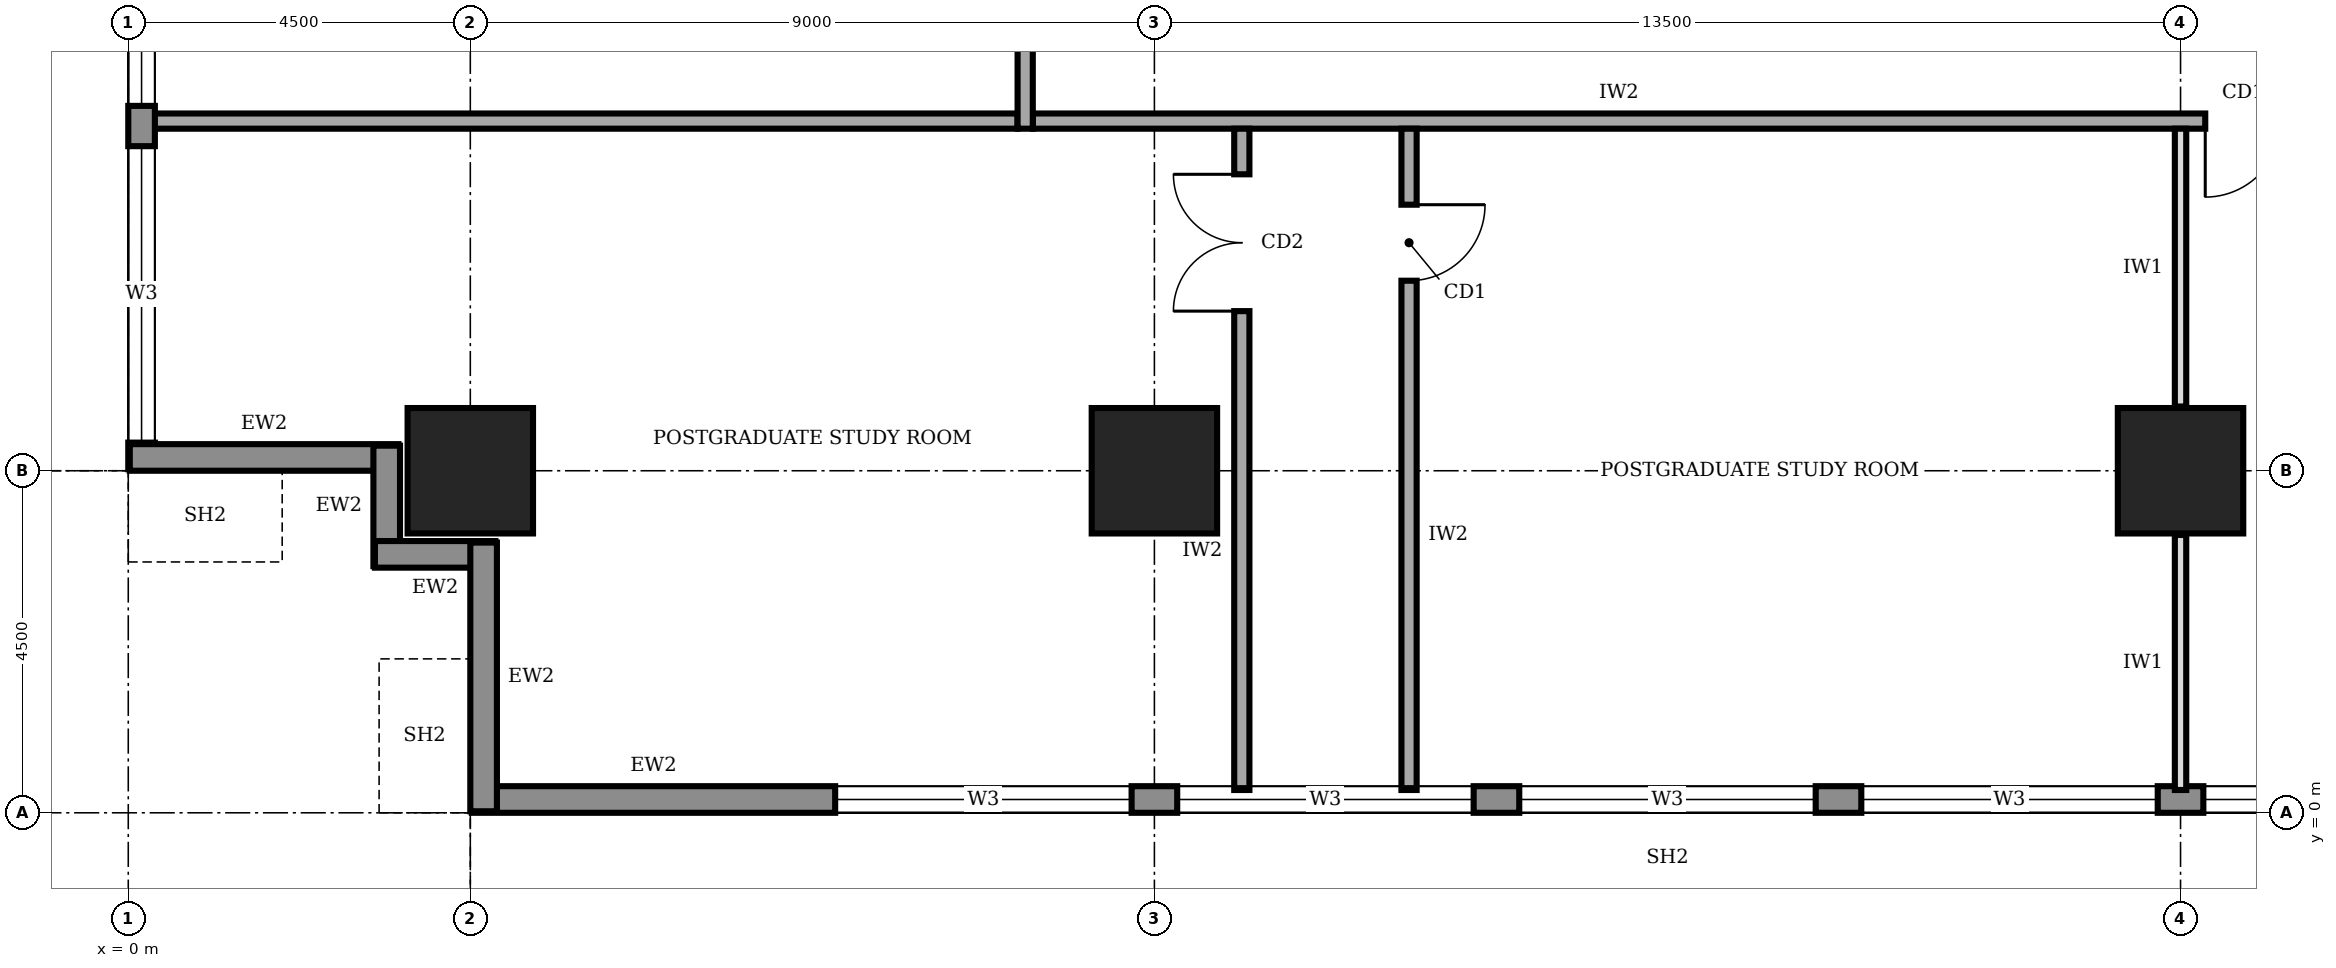
"""IFC4 building model, lengths in metres.
Left out: names, types, materials, properties, quantities, classifications, styles, units other than length and angle.
Written with IfcOpenShell. Run it as: python <this file> out.ifc"""

import sys

from ifc_helpers import new_model, si_unit, direction, frame, frame_2d, origin, origin_2d, place, context, subcontext, project, spatial, rectangle, extrude, element, fill, save


model = new_model("IFC4")
c1 = context("Model", 3, precision=1e-05, world=origin(), true_north=direction((0.0, 1.0)))
c2 = subcontext(c1, "Body", "Model", "MODEL_VIEW")
j1 = project(units=[si_unit("LENGTHUNIT", "METRE"), si_unit("PLANEANGLEUNIT", "RADIAN")], contexts=[c1])
p1 = place(None, origin())
s1 = spatial("IfcSite", under=j1, at=p1, CompositionType="ELEMENT")
p2 = place(p1, origin())
s2 = spatial("IfcBuilding", under=s1, at=p2, CompositionType="ELEMENT")
p3 = place(p2, frame((0.0, 0.0, 177.0)))
s3 = spatial("IfcBuildingStorey", under=s2, at=p3, CompositionType="ELEMENT", Elevation=177.0)
for number, where, z_axis, x_axis in (
    (1, (4.5, 4.5, 0.0), (0.0, 0.0, 1.0), (1.0, 0.0, 0.0)),
    (2, (13.5, 4.5, 0.0), (0.0, 0.0, 1.0), (1.0, 0.0, 0.0)),
    (3, (27.0, 4.5, 0.0), (0.0, 0.0, 1.0), (1.0, 0.0, 0.0)),
):
    element("IfcColumn", number, at=place(p3, frame(where, z_axis=z_axis, x_axis=x_axis)), inside=s3, PredefinedType="COLUMN", context=c2, shape_type="SweptSolid", body=[
        extrude(rectangle(XDim=1.65, YDim=1.65, at=origin_2d()), origin(), (0.0, 0.0, 1.0), 4.0),
    ])
p4 = place(p3, frame((4.52, 0.175, 0.0), z_axis=(0.0, 0.0, 1.0), x_axis=(1.0, 0.0, 0.0)))
e4 = element("IfcWall", 4, at=p4, inside=s3, PredefinedType="STANDARD", context=c2, shape_type="SweptSolid", body=[
    extrude(rectangle(XDim=31.46, YDim=0.35, at=frame_2d((15.73, 0.0))), origin(), (0.0, 0.0, 1.0), 3.75),
])
p5 = place(p4, frame((4.78, 0.0, 0.95)))
e5 = element("IfcOpeningElement", 5, at=p5, cuts=e4, PredefinedType="OPENING", context=c2, shape_type="SweptSolid", body=[
    extrude(rectangle(XDim=3.9, YDim=1.8, at=frame_2d((1.95, 0.9))), frame((0.0, 0.185, 0.0), z_axis=(0.0, -1.0, 0.0), x_axis=(1.0, 0.0, 0.0)), (0.0, 0.0, 1.0), 0.37),
])
p6 = place(p4, frame((9.28, 0.0, 0.95)))
e6 = element("IfcOpeningElement", 6, at=p6, cuts=e4, PredefinedType="OPENING", context=c2, shape_type="SweptSolid", body=[
    extrude(rectangle(XDim=3.9, YDim=1.8, at=frame_2d((1.95, 0.9))), frame((0.0, 0.185, 0.0), z_axis=(0.0, -1.0, 0.0), x_axis=(1.0, 0.0, 0.0)), (0.0, 0.0, 1.0), 0.37),
])
p7 = place(p4, frame((13.78, 0.0, 0.95)))
e7 = element("IfcOpeningElement", 7, at=p7, cuts=e4, PredefinedType="OPENING", context=c2, shape_type="SweptSolid", body=[
    extrude(rectangle(XDim=3.9, YDim=1.8, at=frame_2d((1.95, 0.9))), frame((0.0, 0.185, 0.0), z_axis=(0.0, -1.0, 0.0), x_axis=(1.0, 0.0, 0.0)), (0.0, 0.0, 1.0), 0.37),
])
p8 = place(p4, frame((18.28, 0.0, 0.95)))
e8 = element("IfcOpeningElement", 8, at=p8, cuts=e4, PredefinedType="OPENING", context=c2, shape_type="SweptSolid", body=[
    extrude(rectangle(XDim=3.9, YDim=1.8, at=frame_2d((1.95, 0.9))), frame((0.0, 0.185, 0.0), z_axis=(0.0, -1.0, 0.0), x_axis=(1.0, 0.0, 0.0)), (0.0, 0.0, 1.0), 0.37),
])
p9 = place(p4, frame((22.78, 0.0, 0.95)))
e9 = element("IfcOpeningElement", 9, at=p9, cuts=e4, PredefinedType="OPENING", context=c2, shape_type="SweptSolid", body=[
    extrude(rectangle(XDim=3.9, YDim=1.8, at=frame_2d((1.95, 0.9))), frame((0.0, 0.185, 0.0), z_axis=(0.0, -1.0, 0.0), x_axis=(1.0, 0.0, 0.0)), (0.0, 0.0, 1.0), 0.37),
])
p10 = place(p4, frame((27.21, 0.0, 0.95)))
e10 = element("IfcOpeningElement", 10, at=p10, cuts=e4, PredefinedType="OPENING", context=c2, shape_type="SweptSolid", body=[
    extrude(rectangle(XDim=3.9, YDim=1.8, at=frame_2d((1.95, 0.9))), frame((0.0, 0.185, 0.0), z_axis=(0.0, -1.0, 0.0), x_axis=(1.0, 0.0, 0.0)), (0.0, 0.0, 1.0), 0.37),
])
p11 = place(p3, frame((0.175, 35.98, 0.0), z_axis=(0.0, 0.0, 1.0), x_axis=(0.0, -1.0, 0.0)))
e11 = element("IfcWall", 11, at=p11, inside=s3, PredefinedType="STANDARD", context=c2, shape_type="SweptSolid", body=[
    extrude(rectangle(XDim=31.46, YDim=0.35, at=frame_2d((15.73, 0.0))), origin(), (0.0, 0.0, 1.0), 3.75),
])
p12 = place(p11, frame((27.21, 0.0, 0.95)))
e12 = element("IfcOpeningElement", 12, at=p12, cuts=e11, PredefinedType="OPENING", context=c2, shape_type="SweptSolid", body=[
    extrude(rectangle(XDim=3.9, YDim=1.8, at=frame_2d((1.95, 0.9))), frame((0.0, 0.185, 0.0), z_axis=(0.0, -1.0, 0.0), x_axis=(1.0, 0.0, 0.0)), (0.0, 0.0, 1.0), 0.37),
])
p13 = place(p11, frame((22.78, 0.0, 0.95)))
e13 = element("IfcOpeningElement", 13, at=p13, cuts=e11, PredefinedType="OPENING", context=c2, shape_type="SweptSolid", body=[
    extrude(rectangle(XDim=3.9, YDim=1.8, at=frame_2d((1.95, 0.9))), frame((0.0, 0.185, 0.0), z_axis=(0.0, -1.0, 0.0), x_axis=(1.0, 0.0, 0.0)), (0.0, 0.0, 1.0), 0.37),
])
p14 = place(p11, frame((18.28, 0.0, 0.95)))
e14 = element("IfcOpeningElement", 14, at=p14, cuts=e11, PredefinedType="OPENING", context=c2, shape_type="SweptSolid", body=[
    extrude(rectangle(XDim=3.9, YDim=1.8, at=frame_2d((1.95, 0.9))), frame((0.0, 0.185, 0.0), z_axis=(0.0, -1.0, 0.0), x_axis=(1.0, 0.0, 0.0)), (0.0, 0.0, 1.0), 0.37),
])
p15 = place(p11, frame((13.78, 0.0, 0.95)))
e15 = element("IfcOpeningElement", 15, at=p15, cuts=e11, PredefinedType="OPENING", context=c2, shape_type="SweptSolid", body=[
    extrude(rectangle(XDim=3.9, YDim=1.8, at=frame_2d((1.95, 0.9))), frame((0.0, 0.185, 0.0), z_axis=(0.0, -1.0, 0.0), x_axis=(1.0, 0.0, 0.0)), (0.0, 0.0, 1.0), 0.37),
])
p16 = place(p11, frame((9.28, 0.0, 0.95)))
e16 = element("IfcOpeningElement", 16, at=p16, cuts=e11, PredefinedType="OPENING", context=c2, shape_type="SweptSolid", body=[
    extrude(rectangle(XDim=3.9, YDim=1.8, at=frame_2d((1.95, 0.9))), frame((0.0, 0.185, 0.0), z_axis=(0.0, -1.0, 0.0), x_axis=(1.0, 0.0, 0.0)), (0.0, 0.0, 1.0), 0.37),
])
p17 = place(p11, frame((4.78, 0.0, 0.95)))
e17 = element("IfcOpeningElement", 17, at=p17, cuts=e11, PredefinedType="OPENING", context=c2, shape_type="SweptSolid", body=[
    extrude(rectangle(XDim=3.9, YDim=1.8, at=frame_2d((1.95, 0.9))), frame((0.0, 0.185, 0.0), z_axis=(0.0, -1.0, 0.0), x_axis=(1.0, 0.0, 0.0)), (0.0, 0.0, 1.0), 0.37),
])
p18 = place(p3, frame((0.02, 4.675, 0.0), z_axis=(0.0, 0.0, 1.0), x_axis=(1.0, 0.0, 0.0)))
e18 = element("IfcWall", 18, at=p18, inside=s3, PredefinedType="STANDARD", context=c2, shape_type="SweptSolid", body=[
    extrude(rectangle(XDim=3.535, YDim=0.35, at=frame_2d((1.768, 0.0))), origin(), (0.0, 0.0, 1.0), 2.85),
])
for number, where, z_axis, x_axis in (
    (19, (3.4, 4.83, 0.0), (0.0, 0.0, 1.0), (0.0, -1.0, 0.0)),
    (20, (3.245, 3.4, 0.0), (0.0, 0.0, 1.0), (1.0, 0.0, 0.0)),
):
    element("IfcWall", number, at=place(p3, frame(where, z_axis=z_axis, x_axis=x_axis)), inside=s3, PredefinedType="STANDARD", context=c2, shape_type="SweptSolid", body=[
        extrude(rectangle(XDim=1.585, YDim=0.35, at=frame_2d((0.792, 0.0))), origin(), (0.0, 0.0, 1.0), 3.75),
    ])
p19 = place(p3, frame((4.675, 3.555, 0.0), z_axis=(0.0, 0.0, 1.0), x_axis=(0.0, -1.0, 0.0)))
e21 = element("IfcWall", 21, at=p19, inside=s3, PredefinedType="STANDARD", context=c2, shape_type="SweptSolid", body=[
    extrude(rectangle(XDim=3.535, YDim=0.35, at=frame_2d((1.768, 0.0))), origin(), (0.0, 0.0, 1.0), 2.85),
])
p20 = place(p3, frame((11.9, 9.1, 0.0), z_axis=(0.0, 0.0, 1.0), x_axis=(1.0, 0.0, 0.0)))
e22 = element("IfcWall", 22, at=p20, inside=s3, PredefinedType="SOLIDWALL", context=c2, shape_type="SweptSolid", body=[
    extrude(rectangle(XDim=16.9, YDim=0.2, at=frame_2d((8.45, 0.0))), origin(), (0.0, 0.0, 1.0), 3.75),
])
p21 = place(p20, frame((15.425, 0.0, 0.0)))
e23 = element("IfcOpeningElement", 23, at=p21, cuts=e22, PredefinedType="OPENING", context=c2, shape_type="SweptSolid", body=[
    extrude(rectangle(XDim=1.0, YDim=2.1, at=frame_2d((0.5, 1.05))), frame((0.0, 0.11, 0.0), z_axis=(0.0, -1.0, 0.0), x_axis=(1.0, 0.0, 0.0)), (0.0, 0.0, 1.0), 0.22),
])
p22 = place(p3, frame((11.8, 31.3, 0.0), z_axis=(0.0, 0.0, 1.0), x_axis=(0.0, -1.0, 0.0)))
e24 = element("IfcWall", 24, at=p22, inside=s3, PredefinedType="SOLIDWALL", context=c2, shape_type="SweptSolid", body=[
    extrude(rectangle(XDim=22.3, YDim=0.2, at=frame_2d((11.15, 0.0))), origin(), (0.0, 0.0, 1.0), 3.75),
])
p23 = place(p22, frame((19.55, 0.0, 0.0)))
e25 = element("IfcOpeningElement", 25, at=p23, cuts=e24, PredefinedType="OPENING", context=c2, shape_type="SweptSolid", body=[
    extrude(rectangle(XDim=1.0, YDim=2.1, at=frame_2d((0.5, 1.05))), frame((0.0, 0.11, 0.0), z_axis=(0.0, -1.0, 0.0), x_axis=(1.0, 0.0, 0.0)), (0.0, 0.0, 1.0), 0.22),
])
p24 = place(p22, frame((16.15, 0.0, 0.0)))
e26 = element("IfcOpeningElement", 26, at=p24, cuts=e24, PredefinedType="OPENING", context=c2, shape_type="SweptSolid", body=[
    extrude(rectangle(XDim=0.9, YDim=2.1, at=frame_2d((0.45, 1.05))), frame((0.0, 0.11, 0.0), z_axis=(0.0, -1.0, 0.0), x_axis=(1.0, 0.0, 0.0)), (0.0, 0.0, 1.0), 0.22),
])
p25 = place(p22, frame((12.95, 0.0, 0.0)))
e27 = element("IfcOpeningElement", 27, at=p25, cuts=e24, PredefinedType="OPENING", context=c2, shape_type="SweptSolid", body=[
    extrude(rectangle(XDim=0.9, YDim=2.1, at=frame_2d((0.45, 1.05))), frame((0.0, 0.11, 0.0), z_axis=(0.0, -1.0, 0.0), x_axis=(1.0, 0.0, 0.0)), (0.0, 0.0, 1.0), 0.22),
])
p26 = place(p22, frame((7.4, 0.0, 0.0)))
e28 = element("IfcOpeningElement", 28, at=p26, cuts=e24, PredefinedType="OPENING", context=c2, shape_type="SweptSolid", body=[
    extrude(rectangle(XDim=0.9, YDim=2.1, at=frame_2d((0.45, 1.05))), frame((0.0, 0.11, 0.0), z_axis=(0.0, -1.0, 0.0), x_axis=(1.0, 0.0, 0.0)), (0.0, 0.0, 1.0), 0.22),
])
p27 = place(p22, frame((4.8, 0.0, 0.0)))
e29 = element("IfcOpeningElement", 29, at=p27, cuts=e24, PredefinedType="OPENING", context=c2, shape_type="SweptSolid", body=[
    extrude(rectangle(XDim=1.0, YDim=2.1, at=frame_2d((0.5, 1.05))), frame((0.0, 0.11, 0.0), z_axis=(0.0, -1.0, 0.0), x_axis=(1.0, 0.0, 0.0)), (0.0, 0.0, 1.0), 0.22),
])
p28 = place(p22, frame((9.9, 0.0, 0.0)))
e30 = element("IfcOpeningElement", 30, at=p28, cuts=e24, PredefinedType="OPENING", context=c2, shape_type="SweptSolid", body=[
    extrude(rectangle(XDim=1.0, YDim=2.1, at=frame_2d((0.5, 1.05))), frame((0.0, 0.11, 0.0), z_axis=(0.0, -1.0, 0.0), x_axis=(1.0, 0.0, 0.0)), (0.0, 0.0, 1.0), 0.22),
])
p29 = place(p22, frame((1.55, 0.0, 0.0)))
e31 = element("IfcOpeningElement", 31, at=p29, cuts=e24, PredefinedType="OPENING", context=c2, shape_type="SweptSolid", body=[
    extrude(rectangle(XDim=1.0, YDim=2.1, at=frame_2d((0.5, 1.05))), frame((0.0, 0.11, 0.0), z_axis=(0.0, -1.0, 0.0), x_axis=(1.0, 0.0, 0.0)), (0.0, 0.0, 1.0), 0.22),
])
p30 = place(p3, frame((14.65, 0.3, 0.0), z_axis=(0.0, 0.0, 1.0), x_axis=(0.0, 1.0, 0.0)))
e32 = element("IfcWall", 32, at=p30, inside=s3, PredefinedType="SOLIDWALL", context=c2, shape_type="SweptSolid", body=[
    extrude(rectangle(XDim=8.7, YDim=0.2, at=frame_2d((4.35, 0.0))), origin(), (0.0, 0.0, 1.0), 3.75),
])
p31 = place(p30, frame((6.3, 0.0, 0.0)))
e33 = element("IfcOpeningElement", 33, at=p31, cuts=e32, PredefinedType="OPENING", context=c2, shape_type="SweptSolid", body=[
    extrude(rectangle(XDim=1.8, YDim=2.1, at=frame_2d((0.9, 1.05))), frame((0.0, 0.11, 0.0), z_axis=(0.0, -1.0, 0.0), x_axis=(1.0, 0.0, 0.0)), (0.0, 0.0, 1.0), 0.22),
])
p32 = place(p3, frame((16.85, 9.0, 0.0), z_axis=(0.0, 0.0, 1.0), x_axis=(0.0, -1.0, 0.0)))
e34 = element("IfcWall", 34, at=p32, inside=s3, PredefinedType="SOLIDWALL", context=c2, shape_type="SweptSolid", body=[
    extrude(rectangle(XDim=8.7, YDim=0.2, at=frame_2d((4.35, 0.0))), origin(), (0.0, 0.0, 1.0), 3.75),
])
p33 = place(p32, frame((1.0, 0.0, 0.0)))
e35 = element("IfcOpeningElement", 35, at=p33, cuts=e34, PredefinedType="OPENING", context=c2, shape_type="SweptSolid", body=[
    extrude(rectangle(XDim=1.0, YDim=2.1, at=frame_2d((0.5, 1.05))), frame((0.0, 0.11, 0.0), z_axis=(0.0, -1.0, 0.0), x_axis=(1.0, 0.0, 0.0)), (0.0, 0.0, 1.0), 0.22),
])
p34 = place(p3, frame((0.3, 9.1, 0.0), z_axis=(0.0, 0.0, 1.0), x_axis=(1.0, 0.0, 0.0)))
e36 = element("IfcWall", 36, at=p34, inside=s3, PredefinedType="SOLIDWALL", context=c2, shape_type="SweptSolid", body=[
    extrude(rectangle(XDim=11.4, YDim=0.2, at=frame_2d((5.7, 0.0))), origin(), (0.0, 0.0, 1.0), 3.75),
])
p35 = place(p3, frame((27.0, 0.3, 0.0), z_axis=(0.0, 0.0, 1.0), x_axis=(0.0, 1.0, 0.0)))
e37 = element("IfcWall", 37, at=p35, inside=s3, PredefinedType="PARTITIONING", context=c2, shape_type="SweptSolid", body=[
    extrude(rectangle(XDim=3.355, YDim=0.15, at=frame_2d((1.677, 0.0))), origin(), (0.0, 0.0, 1.0), 2.85),
])
p36 = place(p3, frame((27.0, 5.345, 0.0), z_axis=(0.0, 0.0, 1.0), x_axis=(0.0, 1.0, 0.0)))
e38 = element("IfcWall", 38, at=p36, inside=s3, PredefinedType="PARTITIONING", context=c2, shape_type="SweptSolid", body=[
    extrude(rectangle(XDim=3.655, YDim=0.15, at=frame_2d((1.828, 0.0))), origin(), (0.0, 0.0, 1.0), 2.85),
])
p37 = place(p5, origin())
e39 = element("IfcWindow", 39, at=p37, inside=s3, PartitioningType="SINGLE_PANEL", PredefinedType="WINDOW", context=c2, shape_type="SweptSolid", body=[
    extrude(rectangle(XDim=3.9, YDim=1.8, at=frame_2d((1.95, 0.9))), frame((0.0, 0.03, 0.0), z_axis=(0.0, -1.0, 0.0), x_axis=(1.0, 0.0, 0.0)), (0.0, 0.0, 1.0), 0.06),
])
fill(e5, e39)
p38 = place(p6, origin())
e40 = element("IfcWindow", 40, at=p38, inside=s3, PartitioningType="SINGLE_PANEL", PredefinedType="WINDOW", context=c2, shape_type="SweptSolid", body=[
    extrude(rectangle(XDim=3.9, YDim=1.8, at=frame_2d((1.95, 0.9))), frame((0.0, 0.03, 0.0), z_axis=(0.0, -1.0, 0.0), x_axis=(1.0, 0.0, 0.0)), (0.0, 0.0, 1.0), 0.06),
])
fill(e6, e40)
p39 = place(p7, origin())
e41 = element("IfcWindow", 41, at=p39, inside=s3, PartitioningType="SINGLE_PANEL", PredefinedType="WINDOW", context=c2, shape_type="SweptSolid", body=[
    extrude(rectangle(XDim=3.9, YDim=1.8, at=frame_2d((1.95, 0.9))), frame((0.0, 0.03, 0.0), z_axis=(0.0, -1.0, 0.0), x_axis=(1.0, 0.0, 0.0)), (0.0, 0.0, 1.0), 0.06),
])
fill(e7, e41)
p40 = place(p8, origin())
e42 = element("IfcWindow", 42, at=p40, inside=s3, PartitioningType="SINGLE_PANEL", PredefinedType="WINDOW", context=c2, shape_type="SweptSolid", body=[
    extrude(rectangle(XDim=3.9, YDim=1.8, at=frame_2d((1.95, 0.9))), frame((0.0, 0.03, 0.0), z_axis=(0.0, -1.0, 0.0), x_axis=(1.0, 0.0, 0.0)), (0.0, 0.0, 1.0), 0.06),
])
fill(e8, e42)
p41 = place(p9, origin())
e43 = element("IfcWindow", 43, at=p41, inside=s3, PartitioningType="SINGLE_PANEL", PredefinedType="WINDOW", context=c2, shape_type="SweptSolid", body=[
    extrude(rectangle(XDim=3.9, YDim=1.8, at=frame_2d((1.95, 0.9))), frame((0.0, 0.03, 0.0), z_axis=(0.0, -1.0, 0.0), x_axis=(1.0, 0.0, 0.0)), (0.0, 0.0, 1.0), 0.06),
])
fill(e9, e43)
p42 = place(p12, origin())
e44 = element("IfcWindow", 44, at=p42, inside=s3, PartitioningType="SINGLE_PANEL", PredefinedType="WINDOW", context=c2, shape_type="SweptSolid", body=[
    extrude(rectangle(XDim=3.9, YDim=1.8, at=frame_2d((1.95, 0.9))), frame((0.0, 0.03, 0.0), z_axis=(0.0, -1.0, 0.0), x_axis=(1.0, 0.0, 0.0)), (0.0, 0.0, 1.0), 0.06),
])
fill(e12, e44)
p43 = place(p13, origin())
e45 = element("IfcWindow", 45, at=p43, inside=s3, PartitioningType="SINGLE_PANEL", PredefinedType="WINDOW", context=c2, shape_type="SweptSolid", body=[
    extrude(rectangle(XDim=3.9, YDim=1.8, at=frame_2d((1.95, 0.9))), frame((0.0, 0.03, 0.0), z_axis=(0.0, -1.0, 0.0), x_axis=(1.0, 0.0, 0.0)), (0.0, 0.0, 1.0), 0.06),
])
fill(e13, e45)
p44 = place(p21, frame((1.0, 0.0, 0.0), z_axis=(0.0, 0.0, 1.0), x_axis=(-1.0, 0.0, 0.0)))
e46 = element("IfcDoor", 46, at=p44, inside=s3, OperationType="SINGLE_SWING_RIGHT", PredefinedType="DOOR", context=c2, shape_type="SweptSolid", body=[
    extrude(rectangle(XDim=1.0, YDim=2.1, at=frame_2d((0.5, 1.05))), frame((0.0, 0.025, 0.0), z_axis=(0.0, -1.0, 0.0), x_axis=(1.0, 0.0, 0.0)), (0.0, 0.0, 1.0), 0.05),
])
fill(e23, e46)
p45 = place(p31, origin())
e47 = element("IfcDoor", 47, at=p45, inside=s3, OperationType="DOUBLE_DOOR_SINGLE_SWING", PredefinedType="DOOR", context=c2, shape_type="SweptSolid", body=[
    extrude(rectangle(XDim=1.8, YDim=2.1, at=frame_2d((0.9, 1.05))), frame((0.0, 0.025, 0.0), z_axis=(0.0, -1.0, 0.0), x_axis=(1.0, 0.0, 0.0)), (0.0, 0.0, 1.0), 0.05),
])
fill(e33, e47)
p46 = place(p33, origin())
e48 = element("IfcDoor", 48, at=p46, inside=s3, OperationType="SINGLE_SWING_LEFT", PredefinedType="DOOR", context=c2, shape_type="SweptSolid", body=[
    extrude(rectangle(XDim=1.0, YDim=2.1, at=frame_2d((0.5, 1.05))), frame((0.0, 0.025, 0.0), z_axis=(0.0, -1.0, 0.0), x_axis=(1.0, 0.0, 0.0)), (0.0, 0.0, 1.0), 0.05),
])
fill(e35, e48)
save(model, sys.argv[1])
